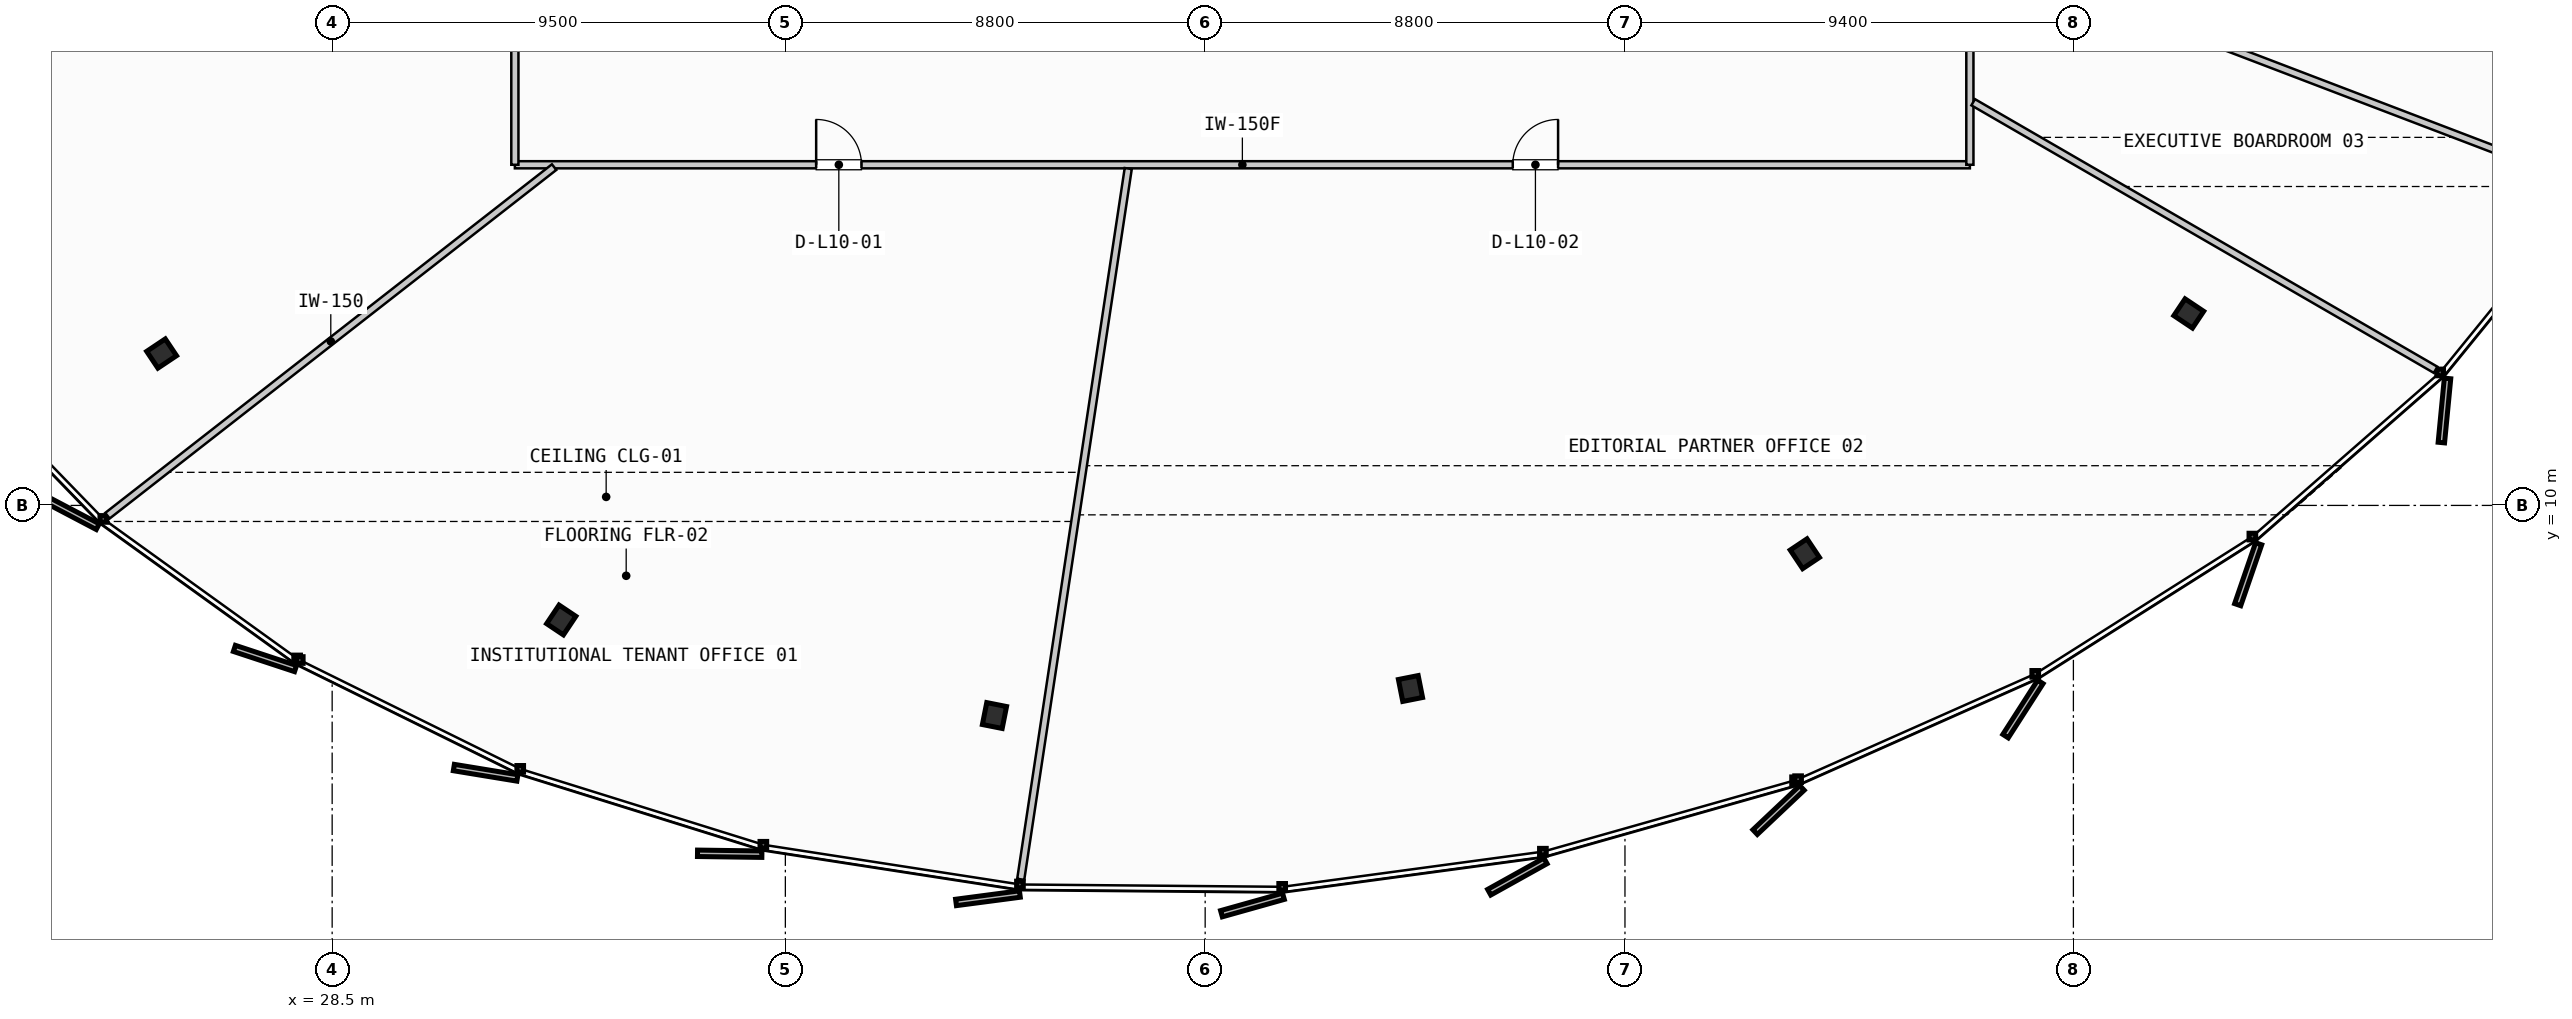
"""IFC4 building model, lengths in metres.
Left out: names, types, materials, properties, quantities, classifications, styles, units other than length and angle.
Written with IfcOpenShell. Run it as: python <this file> out.ifc"""

import sys

from ifc_helpers import new_model, si_unit, direction, frame, frame_2d, origin, origin_2d, place, context, subcontext, project, spatial, rectangle, i_section, extrude, source, transform, mapped, element, fill, save


model = new_model("IFC4")
c1 = context("Model", 3, precision=1e-05, world=origin(), true_north=direction((0.0, 1.0)))
c2 = subcontext(c1, "Body", "Model", "MODEL_VIEW")
j1 = project(units=[si_unit("LENGTHUNIT", "METRE"), si_unit("PLANEANGLEUNIT", "RADIAN")], contexts=[c1])
p1 = place(None, origin())
s1 = spatial("IfcSite", under=j1, at=p1, CompositionType="ELEMENT")
p2 = place(p1, origin())
s2 = spatial("IfcBuilding", under=s1, at=p2, CompositionType="ELEMENT")
p3 = place(p2, frame((0.0, 0.0, 44.8)))
s3 = spatial("IfcBuildingStorey", under=s2, at=p3, CompositionType="ELEMENT", Elevation=44.8)
m1 = source(origin(), c2, "Body", "SweptSolid", [
    extrude(i_section(OverallWidth=0.423, OverallDepth=0.469, WebThickness=0.051, FlangeThickness=0.081, FilletRadius=0.015, at=origin_2d()), origin(), (0.0, 0.0, 1.0), 3.55),
])
for number, where, z_axis, x_axis in (
    (1, (24.925, 13.183, 0.0), (0.0, 0.0, 1.0), (-0.831, -0.556, 0.0)),
    (2, (33.302, 7.599, 0.0), (0.0, 0.0, 1.0), (-0.556, -0.831, 0.0)),
    (3, (42.383, 5.596, 0.0), (0.0, 0.0, 1.0), (-0.195, -0.981, 0.0)),
    (4, (51.104, 6.163, 0.0), (0.0, 0.0, 1.0), (0.195, -0.981, 0.0)),
    (5, (59.37, 8.987, 0.0), (0.0, 0.0, 1.0), (0.556, -0.831, 0.0)),
    (6, (67.418, 14.023, 0.0), (0.0, 0.0, 1.0), (0.831, -0.556, 0.0)),
):
    element("IfcColumn", number, at=place(p3, frame(where, z_axis=z_axis, x_axis=x_axis)), inside=s3, PredefinedType="COLUMN", context=c2, shape_type="MappedRepresentation", body=[
        mapped(m1, transform((0.0, 0.0, 0.0), scale=1.0)),
    ])
p4 = place(p3, frame((32.33, 17.14, 0.0), z_axis=(0.0, 0.0, 1.0), x_axis=(1.0, 0.0, 0.0)))
e7 = element("IfcWall", 7, at=p4, inside=s3, PredefinedType="PARTITIONING", context=c2, shape_type="SweptSolid", body=[
    extrude(rectangle(XDim=30.5, YDim=0.15, at=frame_2d((15.25, 0.0))), origin(), (0.0, 0.0, 1.0), 2.785),
])
p5 = place(p4, frame((6.316, 0.0, 0.0)))
e8 = element("IfcOpeningElement", 8, at=p5, cuts=e7, PredefinedType="OPENING", context=c2, shape_type="SweptSolid", body=[
    extrude(rectangle(XDim=0.95, YDim=2.15, at=frame_2d((0.475, 1.075))), frame((0.0, 0.085, 0.0), z_axis=(0.0, -1.0, 0.0), x_axis=(1.0, 0.0, 0.0)), (0.0, 0.0, 1.0), 0.17),
])
p6 = place(p4, frame((20.918, 0.0, 0.0)))
e9 = element("IfcOpeningElement", 9, at=p6, cuts=e7, PredefinedType="OPENING", context=c2, shape_type="SweptSolid", body=[
    extrude(rectangle(XDim=0.95, YDim=2.15, at=frame_2d((0.475, 1.075))), frame((0.0, 0.085, 0.0), z_axis=(0.0, -1.0, 0.0), x_axis=(1.0, 0.0, 0.0)), (0.0, 0.0, 1.0), 0.17),
])
p7 = place(p3, frame((62.83, 17.14, 0.0), z_axis=(0.0, 0.0, 1.0), x_axis=(0.0, 1.0, 0.0)))
e10 = element("IfcWall", 10, at=p7, inside=s3, PredefinedType="PARTITIONING", context=c2, shape_type="SweptSolid", body=[
    extrude(rectangle(XDim=20.48, YDim=0.15, at=frame_2d((10.24, 0.0))), origin(), (0.0, 0.0, 1.0), 2.785),
])
p8 = place(p7, frame((2.438, 0.0, 0.0)))
e11 = element("IfcOpeningElement", 11, at=p8, cuts=e10, PredefinedType="OPENING", context=c2, shape_type="SweptSolid", body=[
    extrude(rectangle(XDim=0.95, YDim=2.15, at=frame_2d((0.475, 1.075))), frame((0.0, 0.085, 0.0), z_axis=(0.0, -1.0, 0.0), x_axis=(1.0, 0.0, 0.0)), (0.0, 0.0, 1.0), 0.17),
])
p9 = place(p7, frame((11.341, 0.0, 0.0)))
e12 = element("IfcOpeningElement", 12, at=p9, cuts=e10, PredefinedType="OPENING", context=c2, shape_type="SweptSolid", body=[
    extrude(rectangle(XDim=0.95, YDim=2.15, at=frame_2d((0.475, 1.075))), frame((0.0, 0.085, 0.0), z_axis=(0.0, -1.0, 0.0), x_axis=(1.0, 0.0, 0.0)), (0.0, 0.0, 1.0), 0.17),
])
p10 = place(p3, frame((32.33, 37.62, 0.0), z_axis=(0.0, 0.0, 1.0), x_axis=(0.0, -1.0, 0.0)))
e13 = element("IfcWall", 13, at=p10, inside=s3, PredefinedType="PARTITIONING", context=c2, shape_type="SweptSolid", body=[
    extrude(rectangle(XDim=20.48, YDim=0.15, at=frame_2d((10.24, 0.0))), origin(), (0.0, 0.0, 1.0), 2.785),
])
p11 = place(p10, frame((10.028, 0.0, 0.0)))
e14 = element("IfcOpeningElement", 14, at=p11, cuts=e13, PredefinedType="OPENING", context=c2, shape_type="SweptSolid", body=[
    extrude(rectangle(XDim=0.95, YDim=2.15, at=frame_2d((0.475, 1.075))), frame((0.0, 0.085, 0.0), z_axis=(0.0, -1.0, 0.0), x_axis=(1.0, 0.0, 0.0)), (0.0, 0.0, 1.0), 0.17),
])
p12 = place(p3, frame((33.153, 17.091, 0.0), z_axis=(0.0, 0.0, 1.0), x_axis=(-0.788396026169, -0.61516803064, 0.0)))
e15 = element("IfcWall", 15, at=p12, inside=s3, PredefinedType="PARTITIONING", context=c2, shape_type="SweptSolid", body=[
    extrude(rectangle(XDim=11.877, YDim=0.15, at=frame_2d((5.938, 0.0))), origin(), (0.0, 0.0, 1.0), 2.785),
])
p13 = place(p3, frame((45.188, 17.061, 0.0), z_axis=(0.0, 0.0, 1.0), x_axis=(-0.149578810885, -0.988749806237, 0.0)))
e16 = element("IfcWall", 16, at=p13, inside=s3, PredefinedType="PARTITIONING", context=c2, shape_type="SweptSolid", body=[
    extrude(rectangle(XDim=15.067, YDim=0.15, at=frame_2d((7.533, 0.0))), origin(), (0.0, 0.0, 1.0), 2.785),
])
p14 = place(p3, frame((62.899, 18.45, 0.0), z_axis=(0.0, 0.0, 1.0), x_axis=(0.865582468035, -0.500766403656, 0.0)))
e17 = element("IfcWall", 17, at=p14, inside=s3, PredefinedType="PARTITIONING", context=c2, shape_type="SweptSolid", body=[
    extrude(rectangle(XDim=11.199, YDim=0.15, at=frame_2d((5.599, 0.0))), origin(), (0.0, 0.0, 1.0), 2.785),
])
p15 = place(p3, frame((62.905, 21.631, 0.0), z_axis=(0.0, 0.0, 1.0), x_axis=(0.934219568854, -0.356698468137, 0.0)))
e18 = element("IfcWall", 18, at=p15, inside=s3, PredefinedType="PARTITIONING", context=c2, shape_type="SweptSolid", body=[
    extrude(rectangle(XDim=13.758, YDim=0.15, at=frame_2d((6.879, 0.0))), origin(), (0.0, 0.0, 1.0), 2.785),
])
m2 = source(origin(), c2, "Body", "SweptSolid", [
    extrude(rectangle(XDim=0.95, YDim=2.15, at=frame_2d((0.475, 1.075))), frame((0.0, 0.025, 0.0), z_axis=(0.0, -1.0, 0.0), x_axis=(1.0, 0.0, 0.0)), (0.0, 0.0, 1.0), 0.05),
])
p16 = place(p5, origin())
e19 = element("IfcDoor", 19, at=p16, inside=s3, OperationType="SINGLE_SWING_LEFT", PredefinedType="DOOR", context=c2, shape_type="MappedRepresentation", body=[
    mapped(m2, transform((0.0, 0.0, 0.0), scale=1.0)),
])
fill(e8, e19)
p17 = place(p6, origin())
e20 = element("IfcDoor", 20, at=p17, inside=s3, OperationType="SINGLE_SWING_RIGHT", PredefinedType="DOOR", context=c2, shape_type="MappedRepresentation", body=[
    mapped(m2, transform((0.0, 0.0, 0.0), scale=1.0)),
])
fill(e9, e20)
save(model, sys.argv[1])
